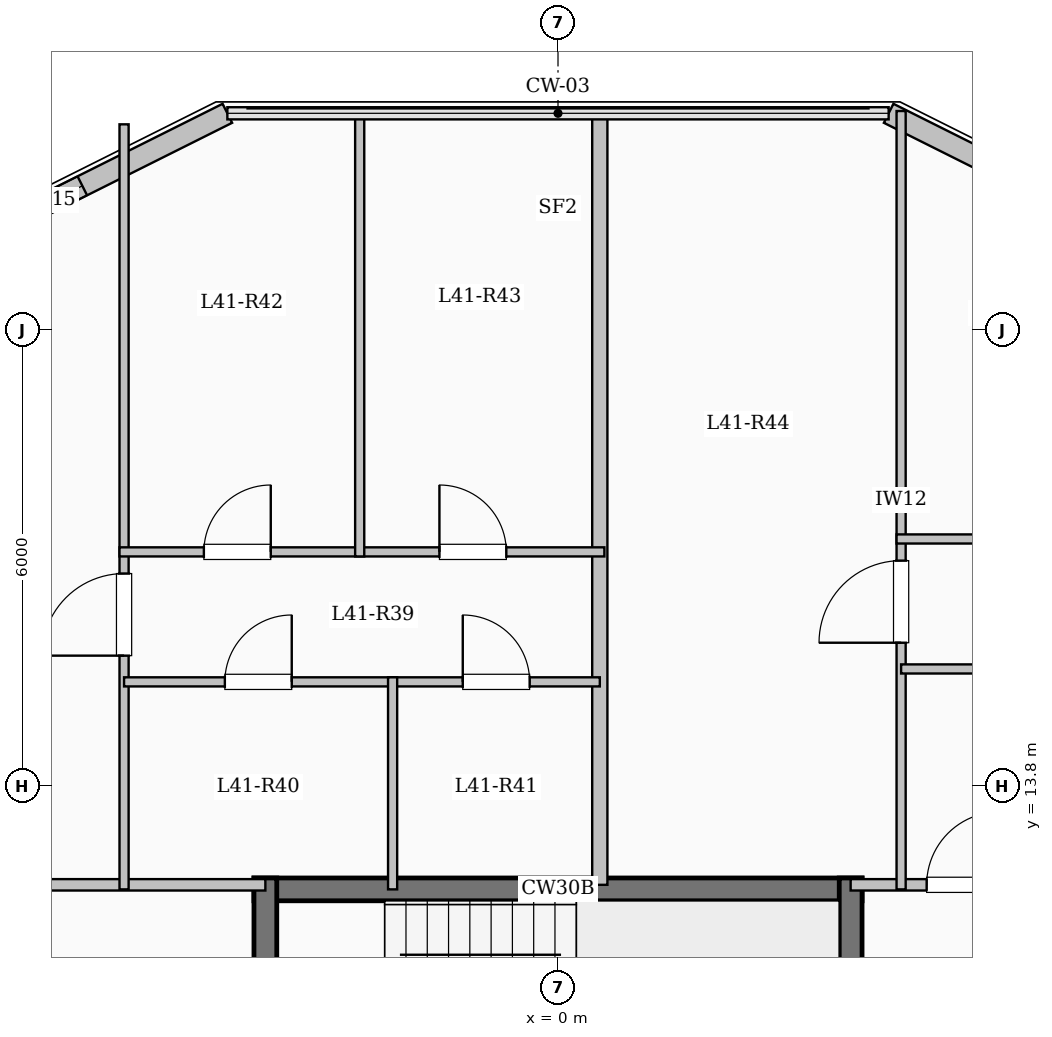
"""IFC4 building model, lengths in metres.
Left out: names, types, materials, properties, quantities, classifications, styles, units other than length and angle.
Written with IfcOpenShell. Run it as: python <this file> out.ifc"""

import sys

from ifc_helpers import new_model, si_unit, direction, frame, frame_2d, origin, place, context, subcontext, project, spatial, rectangle, extrude, element, fill, save


model = new_model("IFC4")
c1 = context("Model", 3, precision=1e-05, world=origin(), true_north=direction((0.0, 1.0)))
c2 = subcontext(c1, "Body", "Model", "MODEL_VIEW")
j1 = project(units=[si_unit("LENGTHUNIT", "METRE"), si_unit("PLANEANGLEUNIT", "RADIAN")], contexts=[c1])
p1 = place(None, origin())
s1 = spatial("IfcSite", under=j1, at=p1, CompositionType="ELEMENT")
p2 = place(p1, origin())
s2 = spatial("IfcBuilding", under=s1, at=p2, CompositionType="ELEMENT")
p3 = place(p2, frame((0.0, 0.0, 152.7)))
s3 = spatial("IfcBuildingStorey", under=s2, at=p3, CompositionType="ELEMENT", Elevation=152.7)
p4 = place(p3, frame((-7.35, 21.15, 0.0), z_axis=(0.0, 0.0, 1.0), x_axis=(0.894427191, 0.4472135955, 0.0)))
e1 = element("IfcWall", 1, at=p4, inside=s3, PredefinedType="SOLIDWALL", context=c2, shape_type="SweptSolid", body=[
    extrude(rectangle(XDim=3.354, YDim=0.28, at=frame_2d((1.677, 0.0))), origin(), (0.0, 0.0, 1.0), 3.1),
])
p5 = place(p4, frame((0.371, 0.0, 0.95)))
e2 = element("IfcOpeningElement", 2, at=p5, cuts=e1, PredefinedType="OPENING", context=c2, shape_type="SweptSolid", body=[
    extrude(rectangle(XDim=0.85, YDim=1.5, at=frame_2d((0.425, 0.75))), frame((0.0, 0.15, 0.0), z_axis=(0.0, -1.0, 0.0), x_axis=(1.0, 0.0, 0.0)), (0.0, 0.0, 1.0), 0.3),
])
p6 = place(p3, frame((4.35, 22.65, 0.0), z_axis=(0.0, 0.0, 1.0), x_axis=(0.894427191, -0.4472135955, 0.0)))
e3 = element("IfcWall", 3, at=p6, inside=s3, PredefinedType="SOLIDWALL", context=c2, shape_type="SweptSolid", body=[
    extrude(rectangle(XDim=3.354, YDim=0.28, at=frame_2d((1.677, 0.0))), origin(), (0.0, 0.0, 1.0), 3.1),
])
p7 = place(p6, frame((1.407, 0.0, 0.95)))
e4 = element("IfcOpeningElement", 4, at=p7, cuts=e3, PredefinedType="OPENING", context=c2, shape_type="SweptSolid", body=[
    extrude(rectangle(XDim=1.2, YDim=1.5, at=frame_2d((0.6, 0.75))), frame((0.0, 0.15, 0.0), z_axis=(0.0, -1.0, 0.0), x_axis=(1.0, 0.0, 0.0)), (0.0, 0.0, 1.0), 0.3),
])
p8 = place(p3, frame((-4.0, 12.44, 0.0), z_axis=(0.0, 0.0, 1.0), x_axis=(1.0, 0.0, 0.0)))
e5 = element("IfcWall", 5, at=p8, inside=s3, PredefinedType="SHEAR", context=c2, shape_type="SweptSolid", body=[
    extrude(rectangle(XDim=8.0, YDim=0.3, at=frame_2d((4.0, 0.0))), origin(), (0.0, 0.0, 1.0), 3.35),
])
for number, where, z_axis, x_axis in (
    (6, (-3.85, 9.0, 0.0), (0.0, 0.0, 1.0), (0.0, 1.0, 0.0)),
    (7, (3.85, 9.0, 0.0), (0.0, 0.0, 1.0), (0.0, 1.0, 0.0)),
):
    element("IfcWall", number, at=place(p3, frame(where, z_axis=z_axis, x_axis=x_axis)), inside=s3, PredefinedType="SHEAR", context=c2, shape_type="SweptSolid", body=[
        extrude(rectangle(XDim=3.59, YDim=0.3, at=frame_2d((1.795, 0.0))), origin(), (0.0, 0.0, 1.0), 3.35),
    ])
p9 = place(p3, frame((-19.55, 12.5, 0.0), z_axis=(0.0, 0.0, 1.0), x_axis=(1.0, 0.0, 0.0)))
e8 = element("IfcWall", 8, at=p9, inside=s3, PredefinedType="PARTITIONING", context=c2, shape_type="SweptSolid", body=[
    extrude(rectangle(XDim=15.7, YDim=0.15, at=frame_2d((7.85, 0.0))), origin(), (0.0, 0.0, 1.0), 3.1),
])
p10 = place(p9, frame((0.7, 0.0, 0.0)))
e9 = element("IfcOpeningElement", 9, at=p10, cuts=e8, PredefinedType="OPENING", context=c2, shape_type="SweptSolid", body=[
    extrude(rectangle(XDim=0.96, YDim=2.15, at=frame_2d((0.48, 1.075))), frame((0.0, 0.085, 0.0), z_axis=(0.0, -1.0, 0.0), x_axis=(1.0, 0.0, 0.0)), (0.0, 0.0, 1.0), 0.17),
])
p11 = place(p9, frame((10.348, 0.0, 0.0)))
e10 = element("IfcOpeningElement", 10, at=p11, cuts=e8, PredefinedType="OPENING", context=c2, shape_type="SweptSolid", body=[
    extrude(rectangle(XDim=0.96, YDim=2.15, at=frame_2d((0.48, 1.075))), frame((0.0, 0.085, 0.0), z_axis=(0.0, -1.0, 0.0), x_axis=(1.0, 0.0, 0.0)), (0.0, 0.0, 1.0), 0.17),
])
p12 = place(p3, frame((3.85, 12.5, 0.0), z_axis=(0.0, 0.0, 1.0), x_axis=(1.0, 0.0, 0.0)))
e11 = element("IfcWall", 11, at=p12, inside=s3, PredefinedType="PARTITIONING", context=c2, shape_type="SweptSolid", body=[
    extrude(rectangle(XDim=15.7, YDim=0.15, at=frame_2d((7.85, 0.0))), origin(), (0.0, 0.0, 1.0), 3.1),
])
p13 = place(p12, frame((1.0, 0.0, 0.0)))
e12 = element("IfcOpeningElement", 12, at=p13, cuts=e11, PredefinedType="OPENING", context=c2, shape_type="SweptSolid", body=[
    extrude(rectangle(XDim=0.96, YDim=2.15, at=frame_2d((0.48, 1.075))), frame((0.0, 0.085, 0.0), z_axis=(0.0, -1.0, 0.0), x_axis=(1.0, 0.0, 0.0)), (0.0, 0.0, 1.0), 0.17),
])
p14 = place(p12, frame((7.28, 0.0, 0.0)))
e13 = element("IfcOpeningElement", 13, at=p14, cuts=e11, PredefinedType="OPENING", context=c2, shape_type="SweptSolid", body=[
    extrude(rectangle(XDim=0.96, YDim=2.15, at=frame_2d((0.48, 1.075))), frame((0.0, 0.085, 0.0), z_axis=(0.0, -1.0, 0.0), x_axis=(1.0, 0.0, 0.0)), (0.0, 0.0, 1.0), 0.17),
])
p15 = place(p3, frame((0.55, 12.5, 0.0), z_axis=(0.0, 0.0, 1.0), x_axis=(0.0, 1.0, 0.0)))
e14 = element("IfcWall", 14, at=p15, inside=s3, PredefinedType="SOLIDWALL", context=c2, shape_type="SweptSolid", body=[
    extrude(rectangle(XDim=10.18, YDim=0.2, at=frame_2d((5.09, 0.0))), origin(), (0.0, 0.0, 1.0), 3.1),
])
p16 = place(p3, frame((-5.709, 12.44, 0.0), z_axis=(0.0, 0.0, 1.0), x_axis=(0.0, 1.0, 0.0)))
e15 = element("IfcWall", 15, at=p16, inside=s3, PredefinedType="PARTITIONING", context=c2, shape_type="SweptSolid", body=[
    extrude(rectangle(XDim=10.065, YDim=0.12, at=frame_2d((5.032, 0.0))), origin(), (0.0, 0.0, 1.0), 3.1),
])
p17 = place(p16, frame((3.075, 0.0, 0.0)))
e16 = element("IfcOpeningElement", 16, at=p17, cuts=e15, PredefinedType="OPENING", context=c2, shape_type="SweptSolid", body=[
    extrude(rectangle(XDim=1.08, YDim=2.15, at=frame_2d((0.54, 1.075))), frame((0.0, 0.07, 0.0), z_axis=(0.0, -1.0, 0.0), x_axis=(1.0, 0.0, 0.0)), (0.0, 0.0, 1.0), 0.14),
])
p18 = place(p3, frame((-5.709, 15.17, 0.0), z_axis=(0.0, 0.0, 1.0), x_axis=(1.0, 0.0, 0.0)))
e17 = element("IfcWall", 17, at=p18, inside=s3, PredefinedType="PARTITIONING", context=c2, shape_type="SweptSolid", body=[
    extrude(rectangle(XDim=3.533, YDim=0.12, at=frame_2d((1.767, 0.0))), origin(), (0.0, 0.0, 1.0), 3.1),
])
p19 = place(p18, frame((1.326, 0.0, 0.0)))
e18 = element("IfcOpeningElement", 18, at=p19, cuts=e17, PredefinedType="OPENING", context=c2, shape_type="SweptSolid", body=[
    extrude(rectangle(XDim=0.88, YDim=2.1, at=frame_2d((0.44, 1.05))), frame((0.0, 0.07, 0.0), z_axis=(0.0, -1.0, 0.0), x_axis=(1.0, 0.0, 0.0)), (0.0, 0.0, 1.0), 0.14),
])
p20 = place(p3, frame((-2.176, 15.17, 0.0), z_axis=(0.0, 0.0, 1.0), x_axis=(1.0, 0.0, 0.0)))
e19 = element("IfcWall", 19, at=p20, inside=s3, PredefinedType="PARTITIONING", context=c2, shape_type="SweptSolid", body=[
    extrude(rectangle(XDim=2.726, YDim=0.12, at=frame_2d((1.363, 0.0))), origin(), (0.0, 0.0, 1.0), 3.1),
])
p21 = place(p20, frame((0.923, 0.0, 0.0)))
e20 = element("IfcOpeningElement", 20, at=p21, cuts=e19, PredefinedType="OPENING", context=c2, shape_type="SweptSolid", body=[
    extrude(rectangle(XDim=0.88, YDim=2.1, at=frame_2d((0.44, 1.05))), frame((0.0, 0.07, 0.0), z_axis=(0.0, -1.0, 0.0), x_axis=(1.0, 0.0, 0.0)), (0.0, 0.0, 1.0), 0.14),
])
p22 = place(p3, frame((-5.769, 16.88, 0.0), z_axis=(0.0, 0.0, 1.0), x_axis=(1.0, 0.0, 0.0)))
e21 = element("IfcWall", 21, at=p22, inside=s3, PredefinedType="PARTITIONING", context=c2, shape_type="SweptSolid", body=[
    extrude(rectangle(XDim=6.379, YDim=0.12, at=frame_2d((3.189, 0.0))), origin(), (0.0, 0.0, 1.0), 2.685),
])
p23 = place(p22, frame((1.11, 0.0, 0.0)))
e22 = element("IfcOpeningElement", 22, at=p23, cuts=e21, PredefinedType="OPENING", context=c2, shape_type="SweptSolid", body=[
    extrude(rectangle(XDim=0.88, YDim=2.1, at=frame_2d((0.44, 1.05))), frame((0.0, 0.07, 0.0), z_axis=(0.0, -1.0, 0.0), x_axis=(1.0, 0.0, 0.0)), (0.0, 0.0, 1.0), 0.14),
])
p24 = place(p22, frame((4.209, 0.0, 0.0)))
e23 = element("IfcOpeningElement", 23, at=p24, cuts=e21, PredefinedType="OPENING", context=c2, shape_type="SweptSolid", body=[
    extrude(rectangle(XDim=0.88, YDim=2.1, at=frame_2d((0.44, 1.05))), frame((0.0, 0.07, 0.0), z_axis=(0.0, -1.0, 0.0), x_axis=(1.0, 0.0, 0.0)), (0.0, 0.0, 1.0), 0.14),
])
p25 = place(p3, frame((-2.176, 12.44, 0.0), z_axis=(0.0, 0.0, 1.0), x_axis=(0.0, 1.0, 0.0)))
e24 = element("IfcWall", 24, at=p25, inside=s3, PredefinedType="PARTITIONING", context=c2, shape_type="SweptSolid", body=[
    extrude(rectangle(XDim=2.79, YDim=0.12, at=frame_2d((1.395, 0.0))), origin(), (0.0, 0.0, 1.0), 3.1),
])
p26 = place(p3, frame((-2.609, 16.82, 0.0), z_axis=(0.0, 0.0, 1.0), x_axis=(0.0, 1.0, 0.0)))
e25 = element("IfcWall", 25, at=p26, inside=s3, PredefinedType="PARTITIONING", context=c2, shape_type="SweptSolid", body=[
    extrude(rectangle(XDim=5.86, YDim=0.12, at=frame_2d((2.93, 0.0))), origin(), (0.0, 0.0, 1.0), 3.1),
])
p27 = place(p3, frame((4.514, 12.44, 0.0), z_axis=(0.0, 0.0, 1.0), x_axis=(0.0, 1.0, 0.0)))
e26 = element("IfcWall", 26, at=p27, inside=s3, PredefinedType="PARTITIONING", context=c2, shape_type="SweptSolid", body=[
    extrude(rectangle(XDim=10.24, YDim=0.12, at=frame_2d((5.12, 0.0))), origin(), (0.0, 0.0, 1.0), 3.1),
])
p28 = place(p27, frame((3.245, 0.0, 0.0)))
e27 = element("IfcOpeningElement", 27, at=p28, cuts=e26, PredefinedType="OPENING", context=c2, shape_type="SweptSolid", body=[
    extrude(rectangle(XDim=1.08, YDim=2.15, at=frame_2d((0.54, 1.075))), frame((0.0, 0.07, 0.0), z_axis=(0.0, -1.0, 0.0), x_axis=(1.0, 0.0, 0.0)), (0.0, 0.0, 1.0), 0.14),
])
p29 = place(p3, frame((4.514, 15.34, 0.0), z_axis=(0.0, 0.0, 1.0), x_axis=(1.0, 0.0, 0.0)))
e28 = element("IfcWall", 28, at=p29, inside=s3, PredefinedType="PARTITIONING", context=c2, shape_type="SweptSolid", body=[
    extrude(rectangle(XDim=2.869, YDim=0.12, at=frame_2d((1.435, 0.0))), origin(), (0.0, 0.0, 1.0), 3.1),
])
p30 = place(p29, frame((0.994, 0.0, 0.0)))
e29 = element("IfcOpeningElement", 29, at=p30, cuts=e28, PredefinedType="OPENING", context=c2, shape_type="SweptSolid", body=[
    extrude(rectangle(XDim=0.88, YDim=2.1, at=frame_2d((0.44, 1.05))), frame((0.0, 0.07, 0.0), z_axis=(0.0, -1.0, 0.0), x_axis=(1.0, 0.0, 0.0)), (0.0, 0.0, 1.0), 0.14),
])
p31 = place(p3, frame((4.454, 17.05, 0.0), z_axis=(0.0, 0.0, 1.0), x_axis=(1.0, 0.0, 0.0)))
e30 = element("IfcWall", 30, at=p31, inside=s3, PredefinedType="PARTITIONING", context=c2, shape_type="SweptSolid", body=[
    extrude(rectangle(XDim=6.036, YDim=0.12, at=frame_2d((3.018, 0.0))), origin(), (0.0, 0.0, 1.0), 2.685),
])
p32 = place(p31, frame((1.024, 0.0, 0.0)))
e31 = element("IfcOpeningElement", 31, at=p32, cuts=e30, PredefinedType="OPENING", context=c2, shape_type="SweptSolid", body=[
    extrude(rectangle(XDim=0.88, YDim=2.1, at=frame_2d((0.44, 1.05))), frame((0.0, 0.07, 0.0), z_axis=(0.0, -1.0, 0.0), x_axis=(1.0, 0.0, 0.0)), (0.0, 0.0, 1.0), 0.14),
])
p33 = place(p31, frame((3.952, 0.0, 0.0)))
e32 = element("IfcOpeningElement", 32, at=p33, cuts=e30, PredefinedType="OPENING", context=c2, shape_type="SweptSolid", body=[
    extrude(rectangle(XDim=0.88, YDim=2.1, at=frame_2d((0.44, 1.05))), frame((0.0, 0.07, 0.0), z_axis=(0.0, -1.0, 0.0), x_axis=(1.0, 0.0, 0.0)), (0.0, 0.0, 1.0), 0.14),
])
p34 = place(p5, origin())
e33 = element("IfcWindow", 33, at=p34, inside=s3, PartitioningType="SINGLE_PANEL", PredefinedType="WINDOW", context=c2, shape_type="SweptSolid", body=[
    extrude(rectangle(XDim=0.85, YDim=1.5, at=frame_2d((0.425, 0.75))), frame((0.0, 0.03, 0.0), z_axis=(0.0, -1.0, 0.0), x_axis=(1.0, 0.0, 0.0)), (0.0, 0.0, 1.0), 0.06),
])
fill(e2, e33)
p35 = place(p17, origin())
e34 = element("IfcDoor", 34, at=p35, inside=s3, OperationType="SINGLE_SWING_LEFT", PredefinedType="DOOR", context=c2, shape_type="SweptSolid", body=[
    extrude(rectangle(XDim=1.08, YDim=2.15, at=frame_2d((0.54, 1.075))), frame((0.0, 0.025, 0.0), z_axis=(0.0, -1.0, 0.0), x_axis=(1.0, 0.0, 0.0)), (0.0, 0.0, 1.0), 0.05),
])
fill(e16, e34)
p36 = place(p19, origin())
e35 = element("IfcDoor", 35, at=p36, inside=s3, OperationType="SINGLE_SWING_RIGHT", PredefinedType="DOOR", context=c2, shape_type="SweptSolid", body=[
    extrude(rectangle(XDim=0.88, YDim=2.1, at=frame_2d((0.44, 1.05))), frame((0.0, 0.025, 0.0), z_axis=(0.0, -1.0, 0.0), x_axis=(1.0, 0.0, 0.0)), (0.0, 0.0, 1.0), 0.05),
])
fill(e18, e35)
p37 = place(p21, origin())
e36 = element("IfcDoor", 36, at=p37, inside=s3, OperationType="SINGLE_SWING_LEFT", PredefinedType="DOOR", context=c2, shape_type="SweptSolid", body=[
    extrude(rectangle(XDim=0.88, YDim=2.1, at=frame_2d((0.44, 1.05))), frame((0.0, 0.025, 0.0), z_axis=(0.0, -1.0, 0.0), x_axis=(1.0, 0.0, 0.0)), (0.0, 0.0, 1.0), 0.05),
])
fill(e20, e36)
p38 = place(p23, origin())
e37 = element("IfcDoor", 37, at=p38, inside=s3, OperationType="SINGLE_SWING_RIGHT", PredefinedType="DOOR", context=c2, shape_type="SweptSolid", body=[
    extrude(rectangle(XDim=0.88, YDim=2.1, at=frame_2d((0.44, 1.05))), frame((0.0, 0.025, 0.0), z_axis=(0.0, -1.0, 0.0), x_axis=(1.0, 0.0, 0.0)), (0.0, 0.0, 1.0), 0.05),
])
fill(e22, e37)
p39 = place(p24, origin())
e38 = element("IfcDoor", 38, at=p39, inside=s3, OperationType="SINGLE_SWING_LEFT", PredefinedType="DOOR", context=c2, shape_type="SweptSolid", body=[
    extrude(rectangle(XDim=0.88, YDim=2.1, at=frame_2d((0.44, 1.05))), frame((0.0, 0.025, 0.0), z_axis=(0.0, -1.0, 0.0), x_axis=(1.0, 0.0, 0.0)), (0.0, 0.0, 1.0), 0.05),
])
fill(e23, e38)
p40 = place(p13, origin())
e39 = element("IfcDoor", 39, at=p40, inside=s3, OperationType="SINGLE_SWING_RIGHT", PredefinedType="DOOR", context=c2, shape_type="SweptSolid", body=[
    extrude(rectangle(XDim=0.96, YDim=2.15, at=frame_2d((0.48, 1.075))), frame((0.0, 0.025, 0.0), z_axis=(0.0, -1.0, 0.0), x_axis=(1.0, 0.0, 0.0)), (0.0, 0.0, 1.0), 0.05),
])
fill(e12, e39)
p41 = place(p28, origin())
e40 = element("IfcDoor", 40, at=p41, inside=s3, OperationType="SINGLE_SWING_LEFT", PredefinedType="DOOR", context=c2, shape_type="SweptSolid", body=[
    extrude(rectangle(XDim=1.08, YDim=2.15, at=frame_2d((0.54, 1.075))), frame((0.0, 0.025, 0.0), z_axis=(0.0, -1.0, 0.0), x_axis=(1.0, 0.0, 0.0)), (0.0, 0.0, 1.0), 0.05),
])
fill(e27, e40)
save(model, sys.argv[1])
